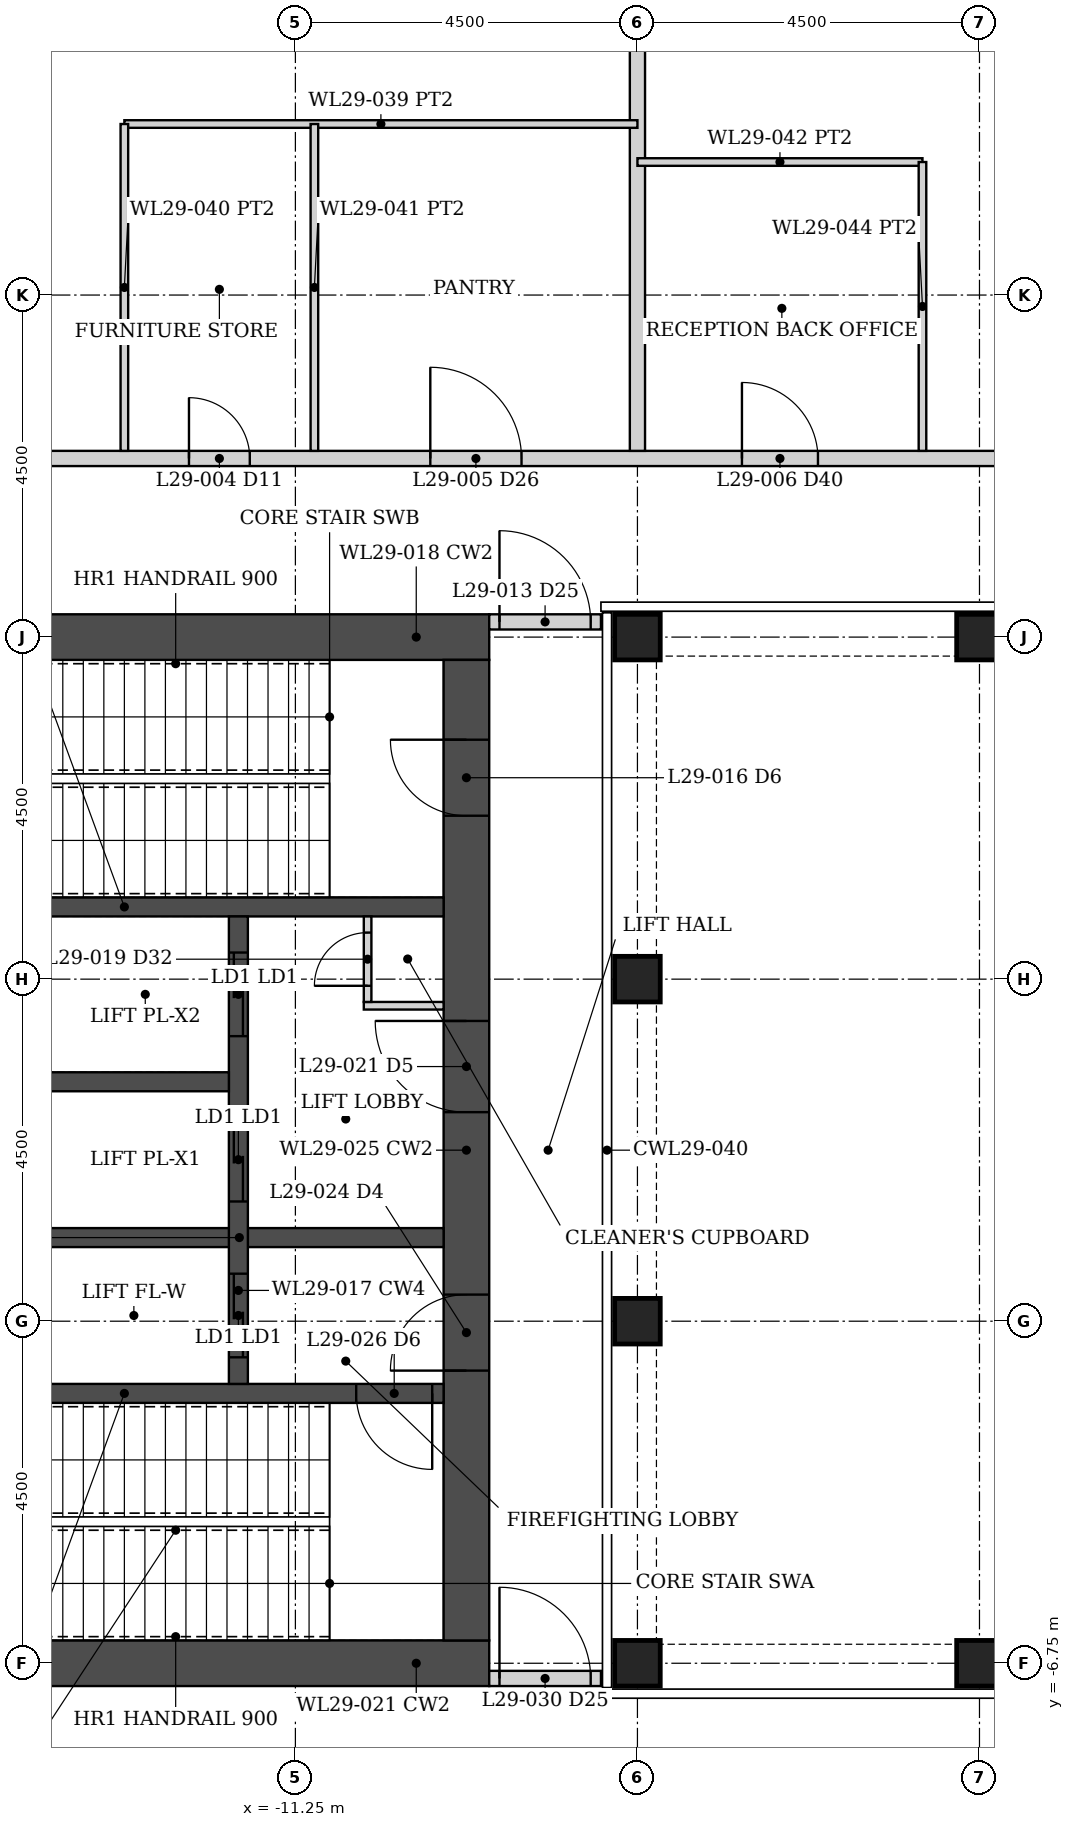
"""IFC4 building model, lengths in metres.
Left out: names, types, materials, properties, quantities, classifications, styles, units other than length and angle.
Written with IfcOpenShell. Run it as: python <this file> out.ifc"""

import sys

from ifc_helpers import new_model, si_unit, direction, frame, frame_2d, origin, origin_2d, place, context, subcontext, project, spatial, rectangle, hollow_rectangle, extrude, element, fill, save


model = new_model("IFC4")
c1 = context("Model", 3, precision=1e-05, world=origin(), true_north=direction((0.0, 1.0)))
c2 = subcontext(c1, "Body", "Model", "MODEL_VIEW")
j1 = project(units=[si_unit("LENGTHUNIT", "METRE"), si_unit("PLANEANGLEUNIT", "RADIAN")], contexts=[c1])
p1 = place(None, origin())
s1 = spatial("IfcSite", under=j1, at=p1, CompositionType="ELEMENT")
p2 = place(p1, origin())
s2 = spatial("IfcBuilding", under=s1, at=p2, CompositionType="ELEMENT")
p3 = place(p2, frame((0.0, 0.0, 112.4)))
s3 = spatial("IfcBuildingStorey", under=s2, at=p3, CompositionType="ELEMENT", Elevation=112.4)
for number, where, z_axis, x_axis in (
    (1, (-6.75, -6.75, 0.0), (0.0, 0.0, 1.0), (1.0, 0.0, 0.0)),
    (2, (-6.75, -2.25, 0.0), (0.0, 0.0, 1.0), (1.0, 0.0, 0.0)),
    (3, (-6.75, 2.25, 0.0), (0.0, 0.0, 1.0), (1.0, 0.0, 0.0)),
    (4, (-6.75, 6.75, 0.0), (0.0, 0.0, 1.0), (1.0, 0.0, 0.0)),
    (5, (-2.25, -6.75, 0.0), (0.0, 0.0, 1.0), (1.0, 0.0, 0.0)),
    (6, (-2.25, 6.75, 0.0), (0.0, 0.0, 1.0), (1.0, 0.0, 0.0)),
):
    element("IfcColumn", number, at=place(p3, frame(where, z_axis=z_axis, x_axis=x_axis)), inside=s3, PredefinedType="COLUMN", context=c2, shape_type="SweptSolid", body=[
        extrude(hollow_rectangle(XDim=0.6, YDim=0.6, WallThickness=0.04, at=origin_2d()), origin(), (0.0, 0.0, 1.0), 6.0),
    ])
for number, where, z_axis, x_axis in (
    (7, (-8.7, -6.75, 0.0), (0.0, 0.0, 1.0), (-1.0, 0.0, 0.0)),
    (8, (-8.7, 6.75, 0.0), (0.0, 0.0, 1.0), (-1.0, 0.0, 0.0)),
):
    element("IfcWall", number, at=place(p3, frame(where, z_axis=z_axis, x_axis=x_axis)), inside=s3, PredefinedType="SHEAR", context=c2, shape_type="SweptSolid", body=[
        extrude(rectangle(XDim=9.6, YDim=0.6, at=frame_2d((4.8, 0.0))), origin(), (0.0, 0.0, 1.0), 6.0),
    ])
p4 = place(p3, frame((-9.0, -6.45, 0.0), z_axis=(0.0, 0.0, 1.0), x_axis=(0.0, 1.0, 0.0)))
e9 = element("IfcWall", 9, at=p4, inside=s3, PredefinedType="SHEAR", context=c2, shape_type="SweptSolid", body=[
    extrude(rectangle(XDim=12.9, YDim=0.6, at=frame_2d((6.45, 0.0))), origin(), (0.0, 0.0, 1.0), 6.0),
])
p5 = place(p4, frame((3.55, 0.0, 0.0)))
e10 = element("IfcOpeningElement", 10, at=p5, cuts=e9, PredefinedType="OPENING", context=c2, shape_type="SweptSolid", body=[
    extrude(rectangle(XDim=1.0, YDim=2.1, at=frame_2d((0.5, 1.05))), frame((0.0, 0.31, 0.0), z_axis=(0.0, -1.0, 0.0), x_axis=(1.0, 0.0, 0.0)), (0.0, 0.0, 1.0), 0.62),
])
p6 = place(p4, frame((6.95, 0.0, 0.0)))
e11 = element("IfcOpeningElement", 11, at=p6, cuts=e9, PredefinedType="OPENING", context=c2, shape_type="SweptSolid", body=[
    extrude(rectangle(XDim=1.2, YDim=2.1, at=frame_2d((0.6, 1.05))), frame((0.0, 0.31, 0.0), z_axis=(0.0, -1.0, 0.0), x_axis=(1.0, 0.0, 0.0)), (0.0, 0.0, 1.0), 0.62),
])
p7 = place(p4, frame((10.85, 0.0, 0.0)))
e12 = element("IfcOpeningElement", 12, at=p7, cuts=e9, PredefinedType="OPENING", context=c2, shape_type="SweptSolid", body=[
    extrude(rectangle(XDim=1.0, YDim=2.1, at=frame_2d((0.5, 1.05))), frame((0.0, 0.31, 0.0), z_axis=(0.0, -1.0, 0.0), x_axis=(1.0, 0.0, 0.0)), (0.0, 0.0, 1.0), 0.62),
])
p8 = place(p3, frame((-9.3, -3.2, 0.0), z_axis=(0.0, 0.0, 1.0), x_axis=(-1.0, 0.0, 0.0)))
e13 = element("IfcWall", 13, at=p8, inside=s3, PredefinedType="SHEAR", context=c2, shape_type="SweptSolid", body=[
    extrude(rectangle(XDim=8.4, YDim=0.25, at=frame_2d((4.2, 0.0))), origin(), (0.0, 0.0, 1.0), 6.0),
])
p9 = place(p8, frame((0.15, 0.0, 0.0)))
e14 = element("IfcOpeningElement", 14, at=p9, cuts=e13, PredefinedType="OPENING", context=c2, shape_type="SweptSolid", body=[
    extrude(rectangle(XDim=1.0, YDim=2.1, at=frame_2d((0.5, 1.05))), frame((0.0, 0.135, 0.0), z_axis=(0.0, -1.0, 0.0), x_axis=(1.0, 0.0, 0.0)), (0.0, 0.0, 1.0), 0.27),
])
p10 = place(p3, frame((-9.3, 3.2, 0.0), z_axis=(0.0, 0.0, 1.0), x_axis=(-1.0, 0.0, 0.0)))
e15 = element("IfcWall", 15, at=p10, inside=s3, PredefinedType="SHEAR", context=c2, shape_type="SweptSolid", body=[
    extrude(rectangle(XDim=8.4, YDim=0.25, at=frame_2d((4.2, 0.0))), origin(), (0.0, 0.0, 1.0), 6.0),
])
p11 = place(p3, frame((-9.3, -1.15, 0.0), z_axis=(0.0, 0.0, 1.0), x_axis=(-1.0, 0.0, 0.0)))
e16 = element("IfcWall", 16, at=p11, inside=s3, PredefinedType="SHEAR", context=c2, shape_type="SweptSolid", body=[
    extrude(rectangle(XDim=5.375, YDim=0.25, at=frame_2d((2.688, 0.0))), origin(), (0.0, 0.0, 1.0), 6.0),
])
p12 = place(p3, frame((-12.0, -3.075, 0.0), z_axis=(0.0, 0.0, 1.0), x_axis=(0.0, 1.0, 0.0)))
e17 = element("IfcWall", 17, at=p12, inside=s3, PredefinedType="SHEAR", context=c2, shape_type="SweptSolid", body=[
    extrude(rectangle(XDim=6.15, YDim=0.25, at=frame_2d((3.075, 0.0))), origin(), (0.0, 0.0, 1.0), 6.0),
])
p13 = place(p12, frame((0.35, 0.0, 0.0)))
e18 = element("IfcOpeningElement", 18, at=p13, cuts=e17, PredefinedType="OPENING", context=c2, shape_type="SweptSolid", body=[
    extrude(rectangle(XDim=1.1, YDim=2.1, at=frame_2d((0.55, 1.05))), frame((0.0, 0.135, 0.0), z_axis=(0.0, -1.0, 0.0), x_axis=(1.0, 0.0, 0.0)), (0.0, 0.0, 1.0), 0.27),
])
p14 = place(p12, frame((2.4, 0.0, 0.0)))
e19 = element("IfcOpeningElement", 19, at=p14, cuts=e17, PredefinedType="OPENING", context=c2, shape_type="SweptSolid", body=[
    extrude(rectangle(XDim=1.1, YDim=2.1, at=frame_2d((0.55, 1.05))), frame((0.0, 0.135, 0.0), z_axis=(0.0, -1.0, 0.0), x_axis=(1.0, 0.0, 0.0)), (0.0, 0.0, 1.0), 0.27),
])
p15 = place(p12, frame((4.575, 0.0, 0.0)))
e20 = element("IfcOpeningElement", 20, at=p15, cuts=e17, PredefinedType="OPENING", context=c2, shape_type="SweptSolid", body=[
    extrude(rectangle(XDim=1.1, YDim=2.1, at=frame_2d((0.55, 1.05))), frame((0.0, 0.135, 0.0), z_axis=(0.0, -1.0, 0.0), x_axis=(1.0, 0.0, 0.0)), (0.0, 0.0, 1.0), 0.27),
])
p16 = place(p3, frame((-12.125, 0.9, 0.0), z_axis=(0.0, 0.0, 1.0), x_axis=(-1.0, 0.0, 0.0)))
e21 = element("IfcWall", 21, at=p16, inside=s3, PredefinedType="SHEAR", context=c2, shape_type="SweptSolid", body=[
    extrude(rectangle(XDim=2.55, YDim=0.25, at=frame_2d((1.275, 0.0))), origin(), (0.0, 0.0, 1.0), 6.0),
])
p17 = place(p3, frame((-8.7, 6.95, 0.0), z_axis=(0.0, 0.0, 1.0), x_axis=(1.0, 0.0, 0.0)))
e22 = element("IfcWall", 22, at=p17, inside=s3, PredefinedType="PARTITIONING", context=c2, shape_type="SweptSolid", body=[
    extrude(rectangle(XDim=1.47, YDim=0.2, at=frame_2d((0.735, 0.0))), origin(), (0.0, 0.0, 1.0), 4.874),
])
p18 = place(p17, frame((0.135, 0.0, 0.0)))
e23 = element("IfcOpeningElement", 23, at=p18, cuts=e22, PredefinedType="OPENING", context=c2, shape_type="SweptSolid", body=[
    extrude(rectangle(XDim=1.2, YDim=2.1, at=frame_2d((0.6, 1.05))), frame((0.0, 0.11, 0.0), z_axis=(0.0, -1.0, 0.0), x_axis=(1.0, 0.0, 0.0)), (0.0, 0.0, 1.0), 0.22),
])
p19 = place(p3, frame((-8.7, -6.95, 0.0), z_axis=(0.0, 0.0, 1.0), x_axis=(1.0, 0.0, 0.0)))
e24 = element("IfcWall", 24, at=p19, inside=s3, PredefinedType="PARTITIONING", context=c2, shape_type="SweptSolid", body=[
    extrude(rectangle(XDim=1.47, YDim=0.2, at=frame_2d((0.735, 0.0))), origin(), (0.0, 0.0, 1.0), 4.874),
])
p20 = place(p19, frame((0.135, 0.0, 0.0)))
e25 = element("IfcOpeningElement", 25, at=p20, cuts=e24, PredefinedType="OPENING", context=c2, shape_type="SweptSolid", body=[
    extrude(rectangle(XDim=1.2, YDim=2.1, at=frame_2d((0.6, 1.05))), frame((0.0, 0.11, 0.0), z_axis=(0.0, -1.0, 0.0), x_axis=(1.0, 0.0, 0.0)), (0.0, 0.0, 1.0), 0.22),
])
p21 = place(p3, frame((-22.275, 9.1, 0.0), z_axis=(0.0, 0.0, 1.0), x_axis=(1.0, 0.0, 0.0)))
e26 = element("IfcWall", 26, at=p21, inside=s3, PredefinedType="PARTITIONING", context=c2, shape_type="SweptSolid", body=[
    extrude(rectangle(XDim=44.55, YDim=0.2, at=frame_2d((22.275, 0.0))), origin(), (0.0, 0.0, 1.0), 4.874),
])
p22 = place(p21, frame((4.065, 0.0, 0.0)))
e27 = element("IfcOpeningElement", 27, at=p22, cuts=e26, PredefinedType="OPENING", context=c2, shape_type="SweptSolid", body=[
    extrude(rectangle(XDim=0.9, YDim=2.1, at=frame_2d((0.45, 1.05))), frame((0.0, 0.11, 0.0), z_axis=(0.0, -1.0, 0.0), x_axis=(1.0, 0.0, 0.0)), (0.0, 0.0, 1.0), 0.22),
])
p23 = place(p21, frame((9.625, 0.0, 0.0)))
e28 = element("IfcOpeningElement", 28, at=p23, cuts=e26, PredefinedType="OPENING", context=c2, shape_type="SweptSolid", body=[
    extrude(rectangle(XDim=0.8, YDim=2.1, at=frame_2d((0.4, 1.05))), frame((0.0, 0.11, 0.0), z_axis=(0.0, -1.0, 0.0), x_axis=(1.0, 0.0, 0.0)), (0.0, 0.0, 1.0), 0.22),
])
p24 = place(p21, frame((12.8, 0.0, 0.0)))
e29 = element("IfcOpeningElement", 29, at=p24, cuts=e26, PredefinedType="OPENING", context=c2, shape_type="SweptSolid", body=[
    extrude(rectangle(XDim=1.2, YDim=2.1, at=frame_2d((0.6, 1.05))), frame((0.0, 0.11, 0.0), z_axis=(0.0, -1.0, 0.0), x_axis=(1.0, 0.0, 0.0)), (0.0, 0.0, 1.0), 0.22),
])
p25 = place(p21, frame((21.825, 0.0, 0.0)))
e30 = element("IfcOpeningElement", 30, at=p25, cuts=e26, PredefinedType="OPENING", context=c2, shape_type="SweptSolid", body=[
    extrude(rectangle(XDim=0.9, YDim=2.1, at=frame_2d((0.45, 1.05))), frame((0.0, 0.11, 0.0), z_axis=(0.0, -1.0, 0.0), x_axis=(1.0, 0.0, 0.0)), (0.0, 0.0, 1.0), 0.22),
])
p26 = place(p21, frame((16.9, 0.0, 0.0)))
e31 = element("IfcOpeningElement", 31, at=p26, cuts=e26, PredefinedType="OPENING", context=c2, shape_type="SweptSolid", body=[
    extrude(rectangle(XDim=1.0, YDim=2.1, at=frame_2d((0.5, 1.05))), frame((0.0, 0.11, 0.0), z_axis=(0.0, -1.0, 0.0), x_axis=(1.0, 0.0, 0.0)), (0.0, 0.0, 1.0), 0.22),
])
p27 = place(p21, frame((26.65, 0.0, 0.0)))
e32 = element("IfcOpeningElement", 32, at=p27, cuts=e26, PredefinedType="OPENING", context=c2, shape_type="SweptSolid", body=[
    extrude(rectangle(XDim=1.0, YDim=2.1, at=frame_2d((0.5, 1.05))), frame((0.0, 0.11, 0.0), z_axis=(0.0, -1.0, 0.0), x_axis=(1.0, 0.0, 0.0)), (0.0, 0.0, 1.0), 0.22),
])
p28 = place(p21, frame((40.436, 0.0, 0.0)))
e33 = element("IfcOpeningElement", 33, at=p28, cuts=e26, PredefinedType="OPENING", context=c2, shape_type="SweptSolid", body=[
    extrude(rectangle(XDim=0.9, YDim=2.1, at=frame_2d((0.45, 1.05))), frame((0.0, 0.11, 0.0), z_axis=(0.0, -1.0, 0.0), x_axis=(1.0, 0.0, 0.0)), (0.0, 0.0, 1.0), 0.22),
])
p29 = place(p21, frame((32.15, 0.0, 0.0)))
e34 = element("IfcOpeningElement", 34, at=p29, cuts=e26, PredefinedType="OPENING", context=c2, shape_type="SweptSolid", body=[
    extrude(rectangle(XDim=1.5, YDim=2.1, at=frame_2d((0.75, 1.05))), frame((0.0, 0.11, 0.0), z_axis=(0.0, -1.0, 0.0), x_axis=(1.0, 0.0, 0.0)), (0.0, 0.0, 1.0), 0.22),
])
p30 = place(p21, frame((37.775, 0.0, 0.0)))
e35 = element("IfcOpeningElement", 35, at=p30, cuts=e26, PredefinedType="OPENING", context=c2, shape_type="SweptSolid", body=[
    extrude(rectangle(XDim=1.0, YDim=2.1, at=frame_2d((0.5, 1.05))), frame((0.0, 0.11, 0.0), z_axis=(0.0, -1.0, 0.0), x_axis=(1.0, 0.0, 0.0)), (0.0, 0.0, 1.0), 0.22),
])
p31 = place(p3, frame((-6.75, 9.2, 0.0), z_axis=(0.0, 0.0, 1.0), x_axis=(0.0, 1.0, 0.0)))
e36 = element("IfcWall", 36, at=p31, inside=s3, PredefinedType="PARTITIONING", context=c2, shape_type="SweptSolid", body=[
    extrude(rectangle(XDim=12.9, YDim=0.2, at=frame_2d((6.45, 0.0))), origin(), (0.0, 0.0, 1.0), 4.874),
])
p32 = place(p3, frame((-13.5, 13.5, 0.0), z_axis=(0.0, 0.0, 1.0), x_axis=(1.0, 0.0, 0.0)))
e37 = element("IfcWall", 37, at=p32, inside=s3, PredefinedType="PARTITIONING", context=c2, shape_type="SweptSolid", body=[
    extrude(rectangle(XDim=6.75, YDim=0.1, at=frame_2d((3.375, 0.0))), origin(), (0.0, 0.0, 1.0), 4.874),
])
for number, where, z_axis, x_axis in (
    (38, (-13.5, 9.2, 0.0), (0.0, 0.0, 1.0), (0.0, 1.0, 0.0)),
    (39, (-11.0, 9.2, 0.0), (0.0, 0.0, 1.0), (0.0, 1.0, 0.0)),
):
    element("IfcWall", number, at=place(p3, frame(where, z_axis=z_axis, x_axis=x_axis)), inside=s3, PredefinedType="PARTITIONING", context=c2, shape_type="SweptSolid", body=[
        extrude(rectangle(XDim=4.3, YDim=0.1, at=frame_2d((2.15, 0.0))), origin(), (0.0, 0.0, 1.0), 4.874),
    ])
p33 = place(p3, frame((-6.75, 13.0, 0.0), z_axis=(0.0, 0.0, 1.0), x_axis=(1.0, 0.0, 0.0)))
e40 = element("IfcWall", 40, at=p33, inside=s3, PredefinedType="PARTITIONING", context=c2, shape_type="SweptSolid", body=[
    extrude(rectangle(XDim=3.75, YDim=0.1, at=frame_2d((1.875, 0.0))), origin(), (0.0, 0.0, 1.0), 4.874),
])
p34 = place(p3, frame((-3.0, 9.2, 0.0), z_axis=(0.0, 0.0, 1.0), x_axis=(0.0, 1.0, 0.0)))
e41 = element("IfcWall", 41, at=p34, inside=s3, PredefinedType="PARTITIONING", context=c2, shape_type="SweptSolid", body=[
    extrude(rectangle(XDim=3.8, YDim=0.1, at=frame_2d((1.9, 0.0))), origin(), (0.0, 0.0, 1.0), 4.874),
])
p35 = place(p3, frame((-10.35, 1.9, 0.0), z_axis=(0.0, 0.0, 1.0), x_axis=(1.0, 0.0, 0.0)))
e42 = element("IfcWall", 42, at=p35, inside=s3, PredefinedType="PARTITIONING", context=c2, shape_type="SweptSolid", body=[
    extrude(rectangle(XDim=1.05, YDim=0.1, at=frame_2d((0.525, 0.0))), origin(), (0.0, 0.0, 1.0), 4.874),
])
p36 = place(p3, frame((-10.3, 1.95, 0.0), z_axis=(0.0, 0.0, 1.0), x_axis=(0.0, 1.0, 0.0)))
e43 = element("IfcWall", 43, at=p36, inside=s3, PredefinedType="PARTITIONING", context=c2, shape_type="SweptSolid", body=[
    extrude(rectangle(XDim=1.125, YDim=0.1, at=frame_2d((0.562, 0.0))), origin(), (0.0, 0.0, 1.0), 4.874),
])
p37 = place(p36, frame((0.212, 0.0, 0.0)))
e44 = element("IfcOpeningElement", 44, at=p37, cuts=e43, PredefinedType="OPENING", context=c2, shape_type="SweptSolid", body=[
    extrude(rectangle(XDim=0.7, YDim=2.1, at=frame_2d((0.35, 1.05))), frame((0.0, 0.06, 0.0), z_axis=(0.0, -1.0, 0.0), x_axis=(1.0, 0.0, 0.0)), (0.0, 0.0, 1.0), 0.12),
])
p38 = place(p18, origin())
e45 = element("IfcDoor", 45, at=p38, inside=s3, OperationType="DOUBLE_DOOR_DOUBLE_SWING", PredefinedType="DOOR", context=c2, shape_type="SweptSolid", body=[
    extrude(rectangle(XDim=1.2, YDim=2.1, at=frame_2d((0.6, 1.05))), frame((0.0, 0.025, 0.0), z_axis=(0.0, -1.0, 0.0), x_axis=(1.0, 0.0, 0.0)), (0.0, 0.0, 1.0), 0.05),
])
fill(e23, e45)
p39 = place(p20, origin())
e46 = element("IfcDoor", 46, at=p39, inside=s3, OperationType="DOUBLE_DOOR_DOUBLE_SWING", PredefinedType="DOOR", context=c2, shape_type="SweptSolid", body=[
    extrude(rectangle(XDim=1.2, YDim=2.1, at=frame_2d((0.6, 1.05))), frame((0.0, 0.025, 0.0), z_axis=(0.0, -1.0, 0.0), x_axis=(1.0, 0.0, 0.0)), (0.0, 0.0, 1.0), 0.05),
])
fill(e25, e46)
p40 = place(p23, origin())
e47 = element("IfcDoor", 47, at=p40, inside=s3, OperationType="SINGLE_SWING_LEFT", PredefinedType="DOOR", context=c2, shape_type="SweptSolid", body=[
    extrude(rectangle(XDim=0.8, YDim=2.1, at=frame_2d((0.4, 1.05))), frame((0.0, 0.025, 0.0), z_axis=(0.0, -1.0, 0.0), x_axis=(1.0, 0.0, 0.0)), (0.0, 0.0, 1.0), 0.05),
])
fill(e28, e47)
p41 = place(p24, origin())
e48 = element("IfcDoor", 48, at=p41, inside=s3, OperationType="SINGLE_SWING_LEFT", PredefinedType="DOOR", context=c2, shape_type="SweptSolid", body=[
    extrude(rectangle(XDim=1.2, YDim=2.1, at=frame_2d((0.6, 1.05))), frame((0.0, 0.025, 0.0), z_axis=(0.0, -1.0, 0.0), x_axis=(1.0, 0.0, 0.0)), (0.0, 0.0, 1.0), 0.05),
])
fill(e29, e48)
p42 = place(p26, origin())
e49 = element("IfcDoor", 49, at=p42, inside=s3, OperationType="SINGLE_SWING_LEFT", PredefinedType="DOOR", context=c2, shape_type="SweptSolid", body=[
    extrude(rectangle(XDim=1.0, YDim=2.1, at=frame_2d((0.5, 1.05))), frame((0.0, 0.025, 0.0), z_axis=(0.0, -1.0, 0.0), x_axis=(1.0, 0.0, 0.0)), (0.0, 0.0, 1.0), 0.05),
])
fill(e31, e49)
p43 = place(p5, origin())
e50 = element("IfcDoor", 50, at=p43, inside=s3, OperationType="SINGLE_SWING_LEFT", PredefinedType="DOOR", context=c2, shape_type="SweptSolid", body=[
    extrude(rectangle(XDim=1.0, YDim=2.1, at=frame_2d((0.5, 1.05))), frame((0.0, 0.025, 0.0), z_axis=(0.0, -1.0, 0.0), x_axis=(1.0, 0.0, 0.0)), (0.0, 0.0, 1.0), 0.05),
])
fill(e10, e50)
p44 = place(p9, origin())
e51 = element("IfcDoor", 51, at=p44, inside=s3, OperationType="SINGLE_SWING_LEFT", PredefinedType="DOOR", context=c2, shape_type="SweptSolid", body=[
    extrude(rectangle(XDim=1.0, YDim=2.1, at=frame_2d((0.5, 1.05))), frame((0.0, 0.025, 0.0), z_axis=(0.0, -1.0, 0.0), x_axis=(1.0, 0.0, 0.0)), (0.0, 0.0, 1.0), 0.05),
])
fill(e14, e51)
p45 = place(p6, origin())
e52 = element("IfcDoor", 52, at=p45, inside=s3, OperationType="SINGLE_SWING_RIGHT", PredefinedType="DOOR", context=c2, shape_type="SweptSolid", body=[
    extrude(rectangle(XDim=1.2, YDim=2.1, at=frame_2d((0.6, 1.05))), frame((0.0, 0.025, 0.0), z_axis=(0.0, -1.0, 0.0), x_axis=(1.0, 0.0, 0.0)), (0.0, 0.0, 1.0), 0.05),
])
fill(e11, e52)
p46 = place(p37, origin())
e53 = element("IfcDoor", 53, at=p46, inside=s3, OperationType="SINGLE_SWING_LEFT", PredefinedType="DOOR", context=c2, shape_type="SweptSolid", body=[
    extrude(rectangle(XDim=0.7, YDim=2.1, at=frame_2d((0.35, 1.05))), frame((0.0, 0.025, 0.0), z_axis=(0.0, -1.0, 0.0), x_axis=(1.0, 0.0, 0.0)), (0.0, 0.0, 1.0), 0.05),
])
fill(e44, e53)
p47 = place(p7, origin())
e54 = element("IfcDoor", 54, at=p47, inside=s3, OperationType="SINGLE_SWING_RIGHT", PredefinedType="DOOR", context=c2, shape_type="SweptSolid", body=[
    extrude(rectangle(XDim=1.0, YDim=2.1, at=frame_2d((0.5, 1.05))), frame((0.0, 0.025, 0.0), z_axis=(0.0, -1.0, 0.0), x_axis=(1.0, 0.0, 0.0)), (0.0, 0.0, 1.0), 0.05),
])
fill(e12, e54)
p48 = place(p13, origin())
e55 = element("IfcDoor", 55, at=p48, inside=s3, OperationType="DOUBLE_DOOR_SLIDING", PredefinedType="DOOR", context=c2, shape_type="SweptSolid", body=[
    extrude(rectangle(XDim=1.1, YDim=2.1, at=frame_2d((0.55, 1.05))), frame((0.0, 0.025, 0.0), z_axis=(0.0, -1.0, 0.0), x_axis=(1.0, 0.0, 0.0)), (0.0, 0.0, 1.0), 0.05),
])
fill(e18, e55)
p49 = place(p14, origin())
e56 = element("IfcDoor", 56, at=p49, inside=s3, OperationType="DOUBLE_DOOR_SLIDING", PredefinedType="DOOR", context=c2, shape_type="SweptSolid", body=[
    extrude(rectangle(XDim=1.1, YDim=2.1, at=frame_2d((0.55, 1.05))), frame((0.0, 0.025, 0.0), z_axis=(0.0, -1.0, 0.0), x_axis=(1.0, 0.0, 0.0)), (0.0, 0.0, 1.0), 0.05),
])
fill(e19, e56)
p50 = place(p15, origin())
e57 = element("IfcDoor", 57, at=p50, inside=s3, OperationType="DOUBLE_DOOR_SLIDING", PredefinedType="DOOR", context=c2, shape_type="SweptSolid", body=[
    extrude(rectangle(XDim=1.1, YDim=2.1, at=frame_2d((0.55, 1.05))), frame((0.0, 0.025, 0.0), z_axis=(0.0, -1.0, 0.0), x_axis=(1.0, 0.0, 0.0)), (0.0, 0.0, 1.0), 0.05),
])
fill(e20, e57)
save(model, sys.argv[1])
